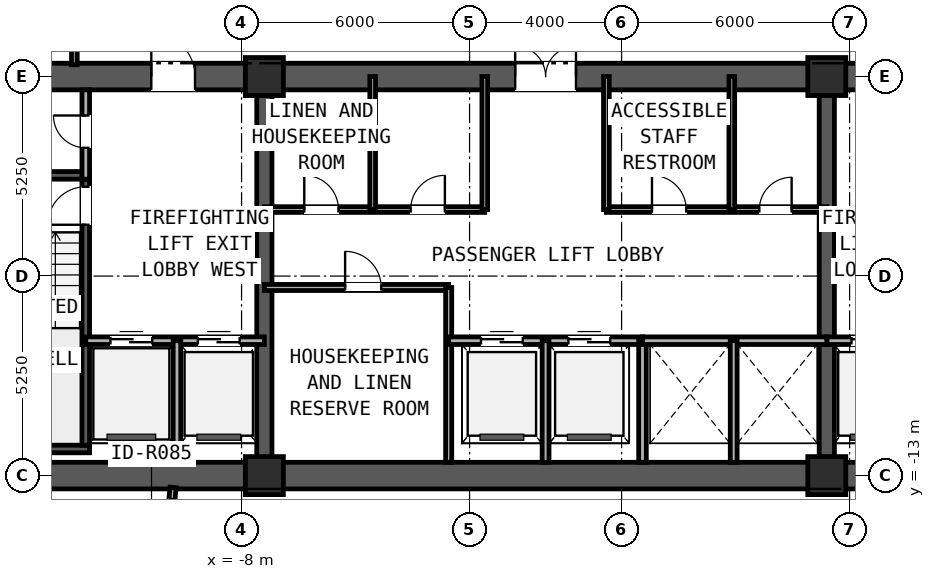
"""IFC4 building model, lengths in metres.
Left out: names, types, materials, properties, quantities, classifications, styles, units other than length and angle.
Written with IfcOpenShell. Run it as: python <this file> out.ifc"""

import sys

from ifc_helpers import new_model, si_unit, direction, frame, frame_2d, origin, origin_2d, place, context, subcontext, project, spatial, rectangle, extrude, element, fill, save


model = new_model("IFC4")
c1 = context("Model", 3, precision=1e-05, world=origin(), true_north=direction((0.0, 1.0)))
c2 = subcontext(c1, "Body", "Model", "MODEL_VIEW")
j1 = project(units=[si_unit("LENGTHUNIT", "METRE"), si_unit("PLANEANGLEUNIT", "RADIAN")], contexts=[c1])
p1 = place(None, origin())
s1 = spatial("IfcSite", under=j1, at=p1, CompositionType="ELEMENT")
p2 = place(p1, origin())
s2 = spatial("IfcBuilding", under=s1, at=p2, CompositionType="ELEMENT")
p3 = place(p2, frame((0.0, 0.0, 163.5)))
s3 = spatial("IfcBuildingStorey", under=s2, at=p3, CompositionType="ELEMENT", Elevation=163.5)
p4 = place(p3, frame((-16.35, -13.0, 0.0), z_axis=(0.0, 0.0, 1.0), x_axis=(1.0, 0.0, 0.0)))
e1 = element("IfcWall", 1, at=p4, inside=s3, PredefinedType="SHEAR", context=c2, shape_type="SweptSolid", body=[
    extrude(rectangle(XDim=32.7, YDim=0.7, at=frame_2d((16.35, 0.0))), origin(), (0.0, 0.0, 1.0), 2.91),
])
p5 = place(p3, frame((-16.35, -2.5, 0.0), z_axis=(0.0, 0.0, 1.0), x_axis=(1.0, 0.0, 0.0)))
e2 = element("IfcWall", 2, at=p5, inside=s3, PredefinedType="SHEAR", context=c2, shape_type="SweptSolid", body=[
    extrude(rectangle(XDim=32.7, YDim=0.7, at=frame_2d((16.35, 0.0))), origin(), (0.0, 0.0, 1.0), 2.91),
])
p6 = place(p5, frame((5.975, 0.0, 0.0)))
e3 = element("IfcOpeningElement", 3, at=p6, cuts=e2, PredefinedType="OPENING", context=c2, shape_type="SweptSolid", body=[
    extrude(rectangle(XDim=1.15, YDim=2.0, at=frame_2d((0.575, 1.0))), frame((0.0, 0.36, 0.0), z_axis=(0.0, -1.0, 0.0), x_axis=(1.0, 0.0, 0.0)), (0.0, 0.0, 1.0), 0.72),
])
p7 = place(p5, frame((15.55, 0.0, 0.0)))
e4 = element("IfcOpeningElement", 4, at=p7, cuts=e2, PredefinedType="OPENING", context=c2, shape_type="SweptSolid", body=[
    extrude(rectangle(XDim=1.6, YDim=2.0, at=frame_2d((0.8, 1.0))), frame((0.0, 0.36, 0.0), z_axis=(0.0, -1.0, 0.0), x_axis=(1.0, 0.0, 0.0)), (0.0, 0.0, 1.0), 0.72),
])
p8 = place(p5, frame((25.575, 0.0, 0.0)))
e5 = element("IfcOpeningElement", 5, at=p8, cuts=e2, PredefinedType="OPENING", context=c2, shape_type="SweptSolid", body=[
    extrude(rectangle(XDim=1.15, YDim=2.0, at=frame_2d((0.575, 1.0))), frame((0.0, 0.36, 0.0), z_axis=(0.0, -1.0, 0.0), x_axis=(1.0, 0.0, 0.0)), (0.0, 0.0, 1.0), 0.72),
])
for number, where, z_axis, x_axis in (
    (6, (-7.4, -12.65, 0.0), (0.0, 0.0, 1.0), (0.0, 1.0, 0.0)),
    (7, (7.4, -12.65, 0.0), (0.0, 0.0, 1.0), (0.0, 1.0, 0.0)),
):
    element("IfcWall", number, at=place(p3, frame(where, z_axis=z_axis, x_axis=x_axis)), inside=s3, PredefinedType="SHEAR", context=c2, shape_type="SweptSolid", body=[
        extrude(rectangle(XDim=9.8, YDim=0.4, at=frame_2d((4.9, 0.0))), origin(), (0.0, 0.0, 1.0), 3.19),
    ])
for number, where, z_axis, x_axis in (
    (8, (-15.65, -12.3, 0.0), (0.0, 0.0, 1.0), (1.0, 0.0, 0.0)),
    (9, (-15.65, -5.1, 0.0), (0.0, 0.0, 1.0), (1.0, 0.0, 0.0)),
):
    element("IfcWall", number, at=place(p3, frame(where, z_axis=z_axis, x_axis=x_axis)), inside=s3, PredefinedType="SOLIDWALL", context=c2, shape_type="SweptSolid", body=[
        extrude(rectangle(XDim=3.65, YDim=0.2, at=frame_2d((1.825, 0.0))), origin(), (0.0, 0.0, 1.0), 3.19),
    ])
p9 = place(p3, frame((-12.1, -12.2, 0.0), z_axis=(0.0, 0.0, 1.0), x_axis=(0.0, 1.0, 0.0)))
e10 = element("IfcWall", 10, at=p9, inside=s3, PredefinedType="SOLIDWALL", context=c2, shape_type="SweptSolid", body=[
    extrude(rectangle(XDim=7.0, YDim=0.2, at=frame_2d((3.5, 0.0))), origin(), (0.0, 0.0, 1.0), 3.19),
])
p10 = place(p9, frame((5.8, 0.0, 0.0)))
e11 = element("IfcOpeningElement", 11, at=p10, cuts=e10, PredefinedType="OPENING", context=c2, shape_type="SweptSolid", body=[
    extrude(rectangle(XDim=1.0, YDim=2.1, at=frame_2d((0.5, 1.05))), frame((0.0, 0.11, 0.0), z_axis=(0.0, -1.0, 0.0), x_axis=(1.0, 0.0, 0.0)), (0.0, 0.0, 1.0), 0.22),
])
for number, where, z_axis, x_axis in (
    (12, (-7.4, -13.0, 0.0), (0.0, 0.0, 1.0), (1.0, 0.0, 0.0)),
    (13, (7.4, -13.0, 0.0), (0.0, 0.0, 1.0), (1.0, 0.0, 0.0)),
    (14, (-7.4, -2.5, 0.0), (0.0, 0.0, 1.0), (1.0, 0.0, 0.0)),
    (15, (7.4, -2.5, 0.0), (0.0, 0.0, 1.0), (1.0, 0.0, 0.0)),
):
    element("IfcColumn", number, at=place(p3, frame(where, z_axis=z_axis, x_axis=x_axis)), inside=s3, PredefinedType="COLUMN", context=c2, shape_type="SweptSolid", body=[
        extrude(rectangle(XDim=1.0, YDim=1.0, at=origin_2d()), origin(), (0.0, 0.0, 1.0), 3.45),
    ])
p11 = place(p3, frame((-26.695, -13.016, 0.0), z_axis=(0.0, 0.0, 1.0), x_axis=(0.995396268366, -0.095845025554, 0.0)))
e16 = element("IfcWall", 16, at=p11, inside=s3, PredefinedType="STANDARD", context=c2, shape_type="SweptSolid", body=[
    extrude(rectangle(XDim=49.6, YDim=0.24, at=frame_2d((24.8, 0.0))), origin(), (0.0, 0.0, 1.0), 3.19),
])
p12 = place(p11, frame((6.044, 0.0, 0.7)))
e17 = element("IfcOpeningElement", 17, at=p12, cuts=e16, PredefinedType="OPENING", context=c2, shape_type="SweptSolid", body=[
    extrude(rectangle(XDim=1.8, YDim=1.5, at=frame_2d((0.9, 0.75))), frame((0.0, 0.13, 0.0), z_axis=(0.0, -1.0, 0.0), x_axis=(1.0, 0.0, 0.0)), (0.0, 0.0, 1.0), 0.26),
])
p13 = place(p11, frame((41.756, 0.0, 0.7)))
e18 = element("IfcOpeningElement", 18, at=p13, cuts=e16, PredefinedType="OPENING", context=c2, shape_type="SweptSolid", body=[
    extrude(rectangle(XDim=1.8, YDim=1.5, at=frame_2d((0.9, 0.75))), frame((0.0, 0.13, 0.0), z_axis=(0.0, -1.0, 0.0), x_axis=(1.0, 0.0, 0.0)), (0.0, 0.0, 1.0), 0.26),
])
p14 = place(p3, frame((-12.1, -5.2, 0.0), z_axis=(0.0, 0.0, 1.0), x_axis=(0.0, 1.0, 0.0)))
e19 = element("IfcWall", 19, at=p14, inside=s3, PredefinedType="PARTITIONING", context=c2, shape_type="SweptSolid", body=[
    extrude(rectangle(XDim=2.35, YDim=0.2, at=frame_2d((1.175, 0.0))), origin(), (0.0, 0.0, 1.0), 2.225),
])
p15 = place(p14, frame((0.825, 0.0, 0.0)))
e20 = element("IfcOpeningElement", 20, at=p15, cuts=e19, PredefinedType="OPENING", context=c2, shape_type="SweptSolid", body=[
    extrude(rectangle(XDim=0.85, YDim=2.05, at=frame_2d((0.425, 1.025))), frame((0.0, 0.11, 0.0), z_axis=(0.0, -1.0, 0.0), x_axis=(1.0, 0.0, 0.0)), (0.0, 0.0, 1.0), 0.22),
])
p16 = place(p3, frame((-12.1, -9.45, 0.0), z_axis=(0.0, 0.0, 1.0), x_axis=(1.0, 0.0, 0.0)))
e21 = element("IfcWall", 21, at=p16, inside=s3, PredefinedType="PARTITIONING", context=c2, shape_type="SweptSolid", body=[
    extrude(rectangle(XDim=4.7, YDim=0.2, at=frame_2d((2.35, 0.0))), origin(), (0.0, 0.0, 1.0), 3.19),
])
p17 = place(p16, frame((0.65, 0.0, 0.0)))
e22 = element("IfcOpeningElement", 22, at=p17, cuts=e21, PredefinedType="OPENING", context=c2, shape_type="SweptSolid", body=[
    extrude(rectangle(XDim=1.1, YDim=2.2, at=frame_2d((0.55, 1.1))), frame((0.0, 0.11, 0.0), z_axis=(0.0, -1.0, 0.0), x_axis=(1.0, 0.0, 0.0)), (0.0, 0.0, 1.0), 0.22),
])
p18 = place(p16, frame((2.95, 0.0, 0.0)))
e23 = element("IfcOpeningElement", 23, at=p18, cuts=e21, PredefinedType="OPENING", context=c2, shape_type="SweptSolid", body=[
    extrude(rectangle(XDim=1.1, YDim=2.2, at=frame_2d((0.55, 1.1))), frame((0.0, 0.11, 0.0), z_axis=(0.0, -1.0, 0.0), x_axis=(1.0, 0.0, 0.0)), (0.0, 0.0, 1.0), 0.22),
])
p19 = place(p3, frame((-9.7, -12.65, 0.0), z_axis=(0.0, 0.0, 1.0), x_axis=(0.0, 1.0, 0.0)))
e24 = element("IfcWall", 24, at=p19, inside=s3, PredefinedType="PARTITIONING", context=c2, shape_type="SweptSolid", body=[
    extrude(rectangle(XDim=3.2, YDim=0.2, at=frame_2d((1.6, 0.0))), origin(), (0.0, 0.0, 1.0), 2.225),
])
p20 = place(p3, frame((7.4, -9.45, 0.0), z_axis=(0.0, 0.0, 1.0), x_axis=(1.0, 0.0, 0.0)))
e25 = element("IfcWall", 25, at=p20, inside=s3, PredefinedType="PARTITIONING", context=c2, shape_type="SweptSolid", body=[
    extrude(rectangle(XDim=4.7, YDim=0.2, at=frame_2d((2.35, 0.0))), origin(), (0.0, 0.0, 1.0), 3.19),
])
p21 = place(p20, frame((2.95, 0.0, 0.0)))
e26 = element("IfcOpeningElement", 26, at=p21, cuts=e25, PredefinedType="OPENING", context=c2, shape_type="SweptSolid", body=[
    extrude(rectangle(XDim=1.1, YDim=2.2, at=frame_2d((0.55, 1.1))), frame((0.0, 0.11, 0.0), z_axis=(0.0, -1.0, 0.0), x_axis=(1.0, 0.0, 0.0)), (0.0, 0.0, 1.0), 0.22),
])
p22 = place(p20, frame((0.65, 0.0, 0.0)))
e27 = element("IfcOpeningElement", 27, at=p22, cuts=e25, PredefinedType="OPENING", context=c2, shape_type="SweptSolid", body=[
    extrude(rectangle(XDim=1.1, YDim=2.2, at=frame_2d((0.55, 1.1))), frame((0.0, 0.11, 0.0), z_axis=(0.0, -1.0, 0.0), x_axis=(1.0, 0.0, 0.0)), (0.0, 0.0, 1.0), 0.22),
])
p23 = place(p3, frame((-7.4, -8.05, 0.0), z_axis=(0.0, 0.0, 1.0), x_axis=(1.0, 0.0, 0.0)))
e28 = element("IfcWall", 28, at=p23, inside=s3, PredefinedType="PARTITIONING", context=c2, shape_type="SweptSolid", body=[
    extrude(rectangle(XDim=4.85, YDim=0.16, at=frame_2d((2.425, 0.0))), origin(), (0.0, 0.0, 1.0), 3.19),
])
p24 = place(p23, frame((2.125, 0.0, 0.0)))
e29 = element("IfcOpeningElement", 29, at=p24, cuts=e28, PredefinedType="OPENING", context=c2, shape_type="SweptSolid", body=[
    extrude(rectangle(XDim=0.95, YDim=2.15, at=frame_2d((0.475, 1.075))), frame((0.0, 0.09, 0.0), z_axis=(0.0, -1.0, 0.0), x_axis=(1.0, 0.0, 0.0)), (0.0, 0.0, 1.0), 0.18),
])
p25 = place(p3, frame((-2.55, -12.65, 0.0), z_axis=(0.0, 0.0, 1.0), x_axis=(0.0, 1.0, 0.0)))
e30 = element("IfcWall", 30, at=p25, inside=s3, PredefinedType="PARTITIONING", context=c2, shape_type="SweptSolid", body=[
    extrude(rectangle(XDim=4.6, YDim=0.16, at=frame_2d((2.3, 0.0))), origin(), (0.0, 0.0, 1.0), 2.225),
])
p26 = place(p3, frame((-2.55, -9.45, 0.0), z_axis=(0.0, 0.0, 1.0), x_axis=(1.0, 0.0, 0.0)))
e31 = element("IfcWall", 31, at=p26, inside=s3, PredefinedType="PARTITIONING", context=c2, shape_type="SweptSolid", body=[
    extrude(rectangle(XDim=5.1, YDim=0.2, at=frame_2d((2.55, 0.0))), origin(), (0.0, 0.0, 1.0), 3.19),
])
p27 = place(p26, frame((0.85, 0.0, 0.0)))
e32 = element("IfcOpeningElement", 32, at=p27, cuts=e31, PredefinedType="OPENING", context=c2, shape_type="SweptSolid", body=[
    extrude(rectangle(XDim=1.1, YDim=2.2, at=frame_2d((0.55, 1.1))), frame((0.0, 0.11, 0.0), z_axis=(0.0, -1.0, 0.0), x_axis=(1.0, 0.0, 0.0)), (0.0, 0.0, 1.0), 0.22),
])
p28 = place(p26, frame((3.15, 0.0, 0.0)))
e33 = element("IfcOpeningElement", 33, at=p28, cuts=e31, PredefinedType="OPENING", context=c2, shape_type="SweptSolid", body=[
    extrude(rectangle(XDim=1.1, YDim=2.2, at=frame_2d((0.55, 1.1))), frame((0.0, 0.11, 0.0), z_axis=(0.0, -1.0, 0.0), x_axis=(1.0, 0.0, 0.0)), (0.0, 0.0, 1.0), 0.22),
])
p29 = place(p3, frame((0.0, -12.65, 0.0), z_axis=(0.0, 0.0, 1.0), x_axis=(0.0, 1.0, 0.0)))
e34 = element("IfcWall", 34, at=p29, inside=s3, PredefinedType="PARTITIONING", context=c2, shape_type="SweptSolid", body=[
    extrude(rectangle(XDim=3.2, YDim=0.18, at=frame_2d((1.6, 0.0))), origin(), (0.0, 0.0, 1.0), 2.225),
])
p30 = place(p3, frame((2.55, -12.65, 0.0), z_axis=(0.0, 0.0, 1.0), x_axis=(0.0, 1.0, 0.0)))
e35 = element("IfcWall", 35, at=p30, inside=s3, PredefinedType="PARTITIONING", context=c2, shape_type="SweptSolid", body=[
    extrude(rectangle(XDim=3.2, YDim=0.2, at=frame_2d((1.6, 0.0))), origin(), (0.0, 0.0, 1.0), 2.225),
])
p31 = place(p3, frame((2.55, -9.45, 0.0), z_axis=(0.0, 0.0, 1.0), x_axis=(1.0, 0.0, 0.0)))
e36 = element("IfcWall", 36, at=p31, inside=s3, PredefinedType="PARTITIONING", context=c2, shape_type="SweptSolid", body=[
    extrude(rectangle(XDim=4.85, YDim=0.2, at=frame_2d((2.425, 0.0))), origin(), (0.0, 0.0, 1.0), 3.19),
])
p32 = place(p3, frame((4.95, -12.65, 0.0), z_axis=(0.0, 0.0, 1.0), x_axis=(0.0, 1.0, 0.0)))
e37 = element("IfcWall", 37, at=p32, inside=s3, PredefinedType="PARTITIONING", context=c2, shape_type="SweptSolid", body=[
    extrude(rectangle(XDim=3.2, YDim=0.18, at=frame_2d((1.6, 0.0))), origin(), (0.0, 0.0, 1.0), 2.225),
])
p33 = place(p3, frame((-7.4, -6.0, 0.0), z_axis=(0.0, 0.0, 1.0), x_axis=(1.0, 0.0, 0.0)))
e38 = element("IfcWall", 38, at=p33, inside=s3, PredefinedType="PARTITIONING", context=c2, shape_type="SweptSolid", body=[
    extrude(rectangle(XDim=5.8, YDim=0.15, at=frame_2d((2.9, 0.0))), origin(), (0.0, 0.0, 1.0), 3.19),
])
p34 = place(p33, frame((1.05, 0.0, 0.0)))
e39 = element("IfcOpeningElement", 39, at=p34, cuts=e38, PredefinedType="OPENING", context=c2, shape_type="SweptSolid", body=[
    extrude(rectangle(XDim=0.9, YDim=2.1, at=frame_2d((0.45, 1.05))), frame((0.0, 0.085, 0.0), z_axis=(0.0, -1.0, 0.0), x_axis=(1.0, 0.0, 0.0)), (0.0, 0.0, 1.0), 0.17),
])
p35 = place(p33, frame((3.85, 0.0, 0.0)))
e40 = element("IfcOpeningElement", 40, at=p35, cuts=e38, PredefinedType="OPENING", context=c2, shape_type="SweptSolid", body=[
    extrude(rectangle(XDim=0.9, YDim=2.1, at=frame_2d((0.45, 1.05))), frame((0.0, 0.085, 0.0), z_axis=(0.0, -1.0, 0.0), x_axis=(1.0, 0.0, 0.0)), (0.0, 0.0, 1.0), 0.17),
])
p36 = place(p3, frame((-1.6, -6.0, 0.0), z_axis=(0.0, 0.0, 1.0), x_axis=(0.0, 1.0, 0.0)))
e41 = element("IfcWall", 41, at=p36, inside=s3, PredefinedType="PARTITIONING", context=c2, shape_type="SweptSolid", body=[
    extrude(rectangle(XDim=3.5, YDim=0.15, at=frame_2d((1.75, 0.0))), origin(), (0.0, 0.0, 1.0), 2.225),
])
p37 = place(p3, frame((1.6, -6.0, 0.0), z_axis=(0.0, 0.0, 1.0), x_axis=(1.0, 0.0, 0.0)))
e42 = element("IfcWall", 42, at=p37, inside=s3, PredefinedType="PARTITIONING", context=c2, shape_type="SweptSolid", body=[
    extrude(rectangle(XDim=5.8, YDim=0.15, at=frame_2d((2.9, 0.0))), origin(), (0.0, 0.0, 1.0), 3.19),
])
p38 = place(p37, frame((1.2, 0.0, 0.0)))
e43 = element("IfcOpeningElement", 43, at=p38, cuts=e42, PredefinedType="OPENING", context=c2, shape_type="SweptSolid", body=[
    extrude(rectangle(XDim=0.9, YDim=2.1, at=frame_2d((0.45, 1.05))), frame((0.0, 0.085, 0.0), z_axis=(0.0, -1.0, 0.0), x_axis=(1.0, 0.0, 0.0)), (0.0, 0.0, 1.0), 0.17),
])
p39 = place(p37, frame((4.025, 0.0, 0.0)))
e44 = element("IfcOpeningElement", 44, at=p39, cuts=e42, PredefinedType="OPENING", context=c2, shape_type="SweptSolid", body=[
    extrude(rectangle(XDim=0.85, YDim=2.05, at=frame_2d((0.425, 1.025))), frame((0.0, 0.085, 0.0), z_axis=(0.0, -1.0, 0.0), x_axis=(1.0, 0.0, 0.0)), (0.0, 0.0, 1.0), 0.17),
])
for number, where, z_axis, x_axis in (
    (45, (1.6, -6.0, 0.0), (0.0, 0.0, 1.0), (0.0, 1.0, 0.0)),
    (46, (-4.55, -6.0, 0.0), (0.0, 0.0, 1.0), (0.0, 1.0, 0.0)),
    (47, (4.9, -6.0, 0.0), (0.0, 0.0, 1.0), (0.0, 1.0, 0.0)),
):
    element("IfcWall", number, at=place(p3, frame(where, z_axis=z_axis, x_axis=x_axis)), inside=s3, PredefinedType="PARTITIONING", context=c2, shape_type="SweptSolid", body=[
        extrude(rectangle(XDim=3.5, YDim=0.15, at=frame_2d((1.75, 0.0))), origin(), (0.0, 0.0, 1.0), 2.225),
    ])
p40 = place(p3, frame((-12.4, -2.19, 0.0), z_axis=(0.0, 0.0, 1.0), x_axis=(0.0, 1.0, 0.0)))
e48 = element("IfcWall", 48, at=p40, inside=s3, PredefinedType="PARTITIONING", context=c2, shape_type="SweptSolid", body=[
    extrude(rectangle(XDim=2.78, YDim=0.15, at=frame_2d((1.39, 0.0))), origin(), (0.0, 0.0, 1.0), 2.225),
])
p41 = place(p3, frame((-9.802, -13.31, 0.0), z_axis=(0.0, 0.0, 1.0), x_axis=(-0.095930256126, -0.995388057975, 0.0)))
e49 = element("IfcWall", 49, at=p41, inside=s3, PredefinedType="PARTITIONING", context=c2, shape_type="SweptSolid", body=[
    extrude(rectangle(XDim=1.367, YDim=0.16, at=frame_2d((0.683, 0.0))), origin(), (0.0, 0.0, 1.0), 2.225),
])
p42 = place(p41, frame((0.306, 0.0, 0.0)))
e50 = element("IfcOpeningElement", 50, at=p42, cuts=e49, PredefinedType="OPENING", context=c2, shape_type="SweptSolid", body=[
    extrude(rectangle(XDim=0.85, YDim=2.05, at=frame_2d((0.425, 1.025))), frame((0.0, 0.09, 0.0), z_axis=(0.0, -1.0, 0.0), x_axis=(1.0, 0.0, 0.0)), (0.0, 0.0, 1.0), 0.18),
])
p43 = place(p10, frame((1.0, 0.0, 0.0), z_axis=(0.0, 0.0, 1.0), x_axis=(-1.0, 0.0, 0.0)))
e51 = element("IfcDoor", 51, at=p43, inside=s3, OperationType="SINGLE_SWING_LEFT", PredefinedType="DOOR", context=c2, shape_type="SweptSolid", body=[
    extrude(rectangle(XDim=1.0, YDim=2.1, at=frame_2d((0.5, 1.05))), frame((0.0, 0.025, 0.0), z_axis=(0.0, -1.0, 0.0), x_axis=(1.0, 0.0, 0.0)), (0.0, 0.0, 1.0), 0.05),
])
fill(e11, e51)
p44 = place(p15, origin())
e52 = element("IfcDoor", 52, at=p44, inside=s3, OperationType="SINGLE_SWING_RIGHT", PredefinedType="DOOR", context=c2, shape_type="SweptSolid", body=[
    extrude(rectangle(XDim=0.85, YDim=2.05, at=frame_2d((0.425, 1.025))), frame((0.0, 0.025, 0.0), z_axis=(0.0, -1.0, 0.0), x_axis=(1.0, 0.0, 0.0)), (0.0, 0.0, 1.0), 0.05),
])
fill(e20, e52)
p45 = place(p17, origin())
e53 = element("IfcDoor", 53, at=p45, inside=s3, OperationType="SLIDING_TO_LEFT", PredefinedType="DOOR", context=c2, shape_type="SweptSolid", body=[
    extrude(rectangle(XDim=1.1, YDim=2.2, at=frame_2d((0.55, 1.1))), frame((0.0, 0.025, 0.0), z_axis=(0.0, -1.0, 0.0), x_axis=(1.0, 0.0, 0.0)), (0.0, 0.0, 1.0), 0.05),
])
fill(e22, e53)
p46 = place(p18, origin())
e54 = element("IfcDoor", 54, at=p46, inside=s3, OperationType="SLIDING_TO_RIGHT", PredefinedType="DOOR", context=c2, shape_type="SweptSolid", body=[
    extrude(rectangle(XDim=1.1, YDim=2.2, at=frame_2d((0.55, 1.1))), frame((0.0, 0.025, 0.0), z_axis=(0.0, -1.0, 0.0), x_axis=(1.0, 0.0, 0.0)), (0.0, 0.0, 1.0), 0.05),
])
fill(e23, e54)
p47 = place(p22, origin())
e55 = element("IfcDoor", 55, at=p47, inside=s3, OperationType="SLIDING_TO_RIGHT", PredefinedType="DOOR", context=c2, shape_type="SweptSolid", body=[
    extrude(rectangle(XDim=1.1, YDim=2.2, at=frame_2d((0.55, 1.1))), frame((0.0, 0.025, 0.0), z_axis=(0.0, -1.0, 0.0), x_axis=(1.0, 0.0, 0.0)), (0.0, 0.0, 1.0), 0.05),
])
fill(e27, e55)
p48 = place(p6, origin())
e56 = element("IfcDoor", 56, at=p48, inside=s3, OperationType="SINGLE_SWING_LEFT", PredefinedType="DOOR", context=c2, shape_type="SweptSolid", body=[
    extrude(rectangle(XDim=1.15, YDim=2.0, at=frame_2d((0.575, 1.0))), frame((0.0, 0.025, 0.0), z_axis=(0.0, -1.0, 0.0), x_axis=(1.0, 0.0, 0.0)), (0.0, 0.0, 1.0), 0.05),
])
fill(e3, e56)
p49 = place(p7, origin())
e57 = element("IfcDoor", 57, at=p49, inside=s3, OperationType="DOUBLE_DOOR_SINGLE_SWING", PredefinedType="DOOR", context=c2, shape_type="SweptSolid", body=[
    extrude(rectangle(XDim=1.6, YDim=2.0, at=frame_2d((0.8, 1.0))), frame((0.0, 0.025, 0.0), z_axis=(0.0, -1.0, 0.0), x_axis=(1.0, 0.0, 0.0)), (0.0, 0.0, 1.0), 0.05),
])
fill(e4, e57)
p50 = place(p24, origin())
e58 = element("IfcDoor", 58, at=p50, inside=s3, OperationType="SINGLE_SWING_LEFT", PredefinedType="DOOR", context=c2, shape_type="SweptSolid", body=[
    extrude(rectangle(XDim=0.95, YDim=2.15, at=frame_2d((0.475, 1.075))), frame((0.0, 0.025, 0.0), z_axis=(0.0, -1.0, 0.0), x_axis=(1.0, 0.0, 0.0)), (0.0, 0.0, 1.0), 0.05),
])
fill(e29, e58)
p51 = place(p27, origin())
e59 = element("IfcDoor", 59, at=p51, inside=s3, OperationType="SLIDING_TO_RIGHT", PredefinedType="DOOR", context=c2, shape_type="SweptSolid", body=[
    extrude(rectangle(XDim=1.1, YDim=2.2, at=frame_2d((0.55, 1.1))), frame((0.0, 0.025, 0.0), z_axis=(0.0, -1.0, 0.0), x_axis=(1.0, 0.0, 0.0)), (0.0, 0.0, 1.0), 0.05),
])
fill(e32, e59)
p52 = place(p28, origin())
e60 = element("IfcDoor", 60, at=p52, inside=s3, OperationType="SLIDING_TO_RIGHT", PredefinedType="DOOR", context=c2, shape_type="SweptSolid", body=[
    extrude(rectangle(XDim=1.1, YDim=2.2, at=frame_2d((0.55, 1.1))), frame((0.0, 0.025, 0.0), z_axis=(0.0, -1.0, 0.0), x_axis=(1.0, 0.0, 0.0)), (0.0, 0.0, 1.0), 0.05),
])
fill(e33, e60)
p53 = place(p34, frame((0.9, 0.0, 0.0), z_axis=(0.0, 0.0, 1.0), x_axis=(-1.0, 0.0, 0.0)))
e61 = element("IfcDoor", 61, at=p53, inside=s3, OperationType="SINGLE_SWING_LEFT", PredefinedType="DOOR", context=c2, shape_type="SweptSolid", body=[
    extrude(rectangle(XDim=0.9, YDim=2.1, at=frame_2d((0.45, 1.05))), frame((0.0, 0.025, 0.0), z_axis=(0.0, -1.0, 0.0), x_axis=(1.0, 0.0, 0.0)), (0.0, 0.0, 1.0), 0.05),
])
fill(e39, e61)
p54 = place(p35, frame((0.9, 0.0, 0.0), z_axis=(0.0, 0.0, 1.0), x_axis=(-1.0, 0.0, 0.0)))
e62 = element("IfcDoor", 62, at=p54, inside=s3, OperationType="SINGLE_SWING_RIGHT", PredefinedType="DOOR", context=c2, shape_type="SweptSolid", body=[
    extrude(rectangle(XDim=0.9, YDim=2.1, at=frame_2d((0.45, 1.05))), frame((0.0, 0.025, 0.0), z_axis=(0.0, -1.0, 0.0), x_axis=(1.0, 0.0, 0.0)), (0.0, 0.0, 1.0), 0.05),
])
fill(e40, e62)
p55 = place(p38, frame((0.9, 0.0, 0.0), z_axis=(0.0, 0.0, 1.0), x_axis=(-1.0, 0.0, 0.0)))
e63 = element("IfcDoor", 63, at=p55, inside=s3, OperationType="SINGLE_SWING_LEFT", PredefinedType="DOOR", context=c2, shape_type="SweptSolid", body=[
    extrude(rectangle(XDim=0.9, YDim=2.1, at=frame_2d((0.45, 1.05))), frame((0.0, 0.025, 0.0), z_axis=(0.0, -1.0, 0.0), x_axis=(1.0, 0.0, 0.0)), (0.0, 0.0, 1.0), 0.05),
])
fill(e43, e63)
p56 = place(p39, frame((0.85, 0.0, 0.0), z_axis=(0.0, 0.0, 1.0), x_axis=(-1.0, 0.0, 0.0)))
e64 = element("IfcDoor", 64, at=p56, inside=s3, OperationType="SINGLE_SWING_RIGHT", PredefinedType="DOOR", context=c2, shape_type="SweptSolid", body=[
    extrude(rectangle(XDim=0.85, YDim=2.05, at=frame_2d((0.425, 1.025))), frame((0.0, 0.025, 0.0), z_axis=(0.0, -1.0, 0.0), x_axis=(1.0, 0.0, 0.0)), (0.0, 0.0, 1.0), 0.05),
])
fill(e44, e64)
p57 = place(p42, frame((0.85, 0.0, 0.0), z_axis=(0.0, 0.0, 1.0), x_axis=(-1.0, 0.0, 0.0)))
e65 = element("IfcDoor", 65, at=p57, inside=s3, OperationType="SINGLE_SWING_RIGHT", PredefinedType="DOOR", context=c2, shape_type="SweptSolid", body=[
    extrude(rectangle(XDim=0.85, YDim=2.05, at=frame_2d((0.425, 1.025))), frame((0.0, 0.025, 0.0), z_axis=(0.0, -1.0, 0.0), x_axis=(1.0, 0.0, 0.0)), (0.0, 0.0, 1.0), 0.05),
])
fill(e50, e65)
save(model, sys.argv[1])
